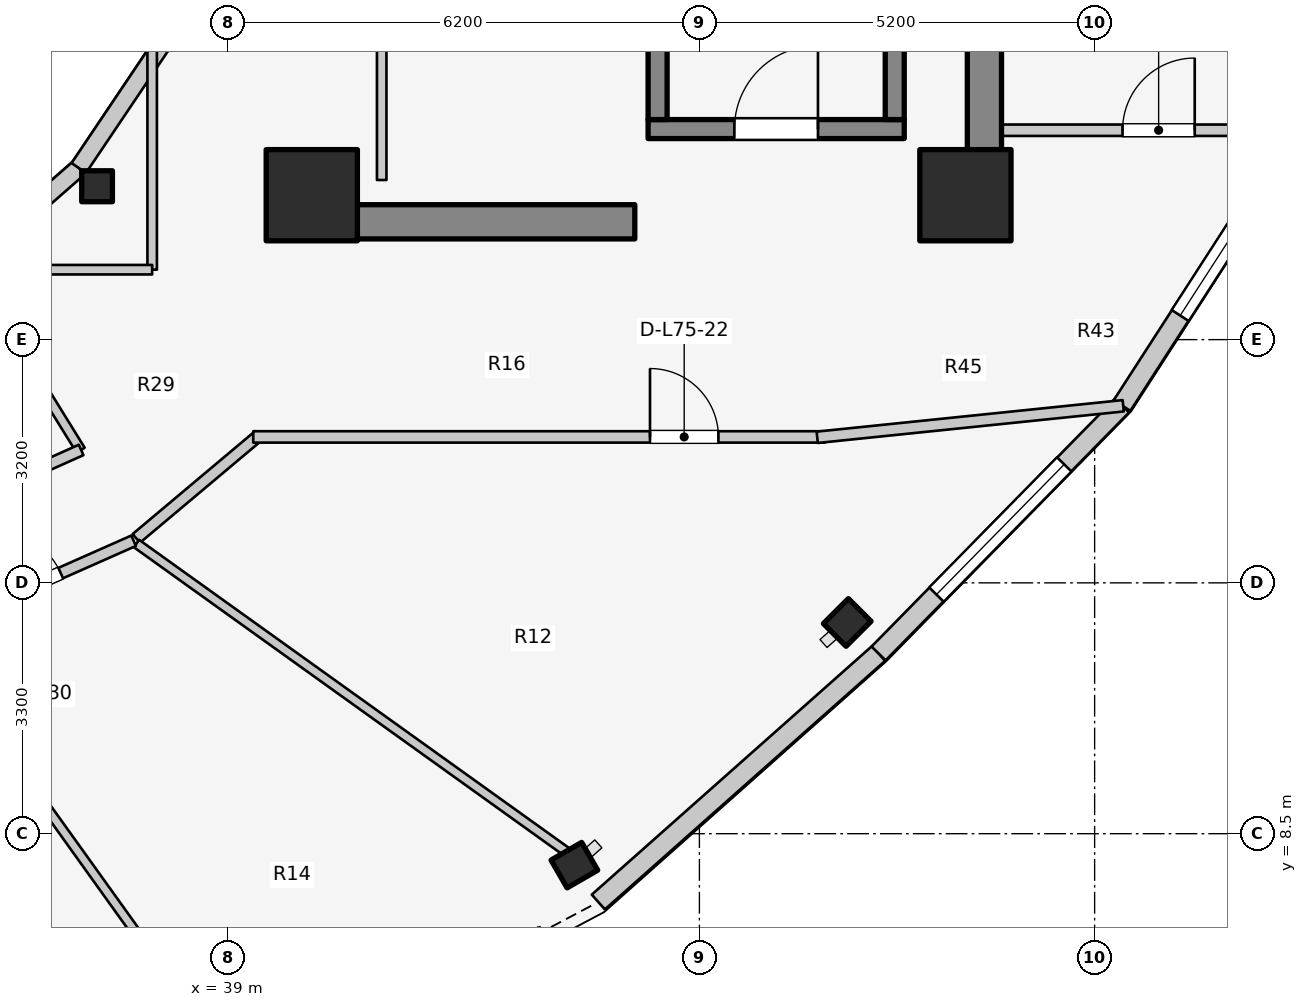
"""IFC4 building model, lengths in metres.
Left out: names, types, materials, properties, quantities, classifications, styles, units other than length and angle.
Written with IfcOpenShell. Run it as: python <this file> out.ifc"""

import sys

from ifc_helpers import new_model, si_unit, direction, frame, frame_2d, origin, origin_2d, place, context, subcontext, project, spatial, rectangle, i_section, extrude, element, fill, save


model = new_model("IFC4")
c1 = context("Model", 3, precision=1e-05, world=origin(), true_north=direction((0.0, 1.0)))
c2 = subcontext(c1, "Body", "Model", "MODEL_VIEW")
j1 = project(units=[si_unit("LENGTHUNIT", "METRE"), si_unit("PLANEANGLEUNIT", "RADIAN")], contexts=[c1])
p1 = place(None, origin())
s1 = spatial("IfcSite", under=j1, at=p1, CompositionType="ELEMENT")
p2 = place(p1, origin())
s2 = spatial("IfcBuilding", under=s1, at=p2, CompositionType="ELEMENT")
p3 = place(p2, frame((0.0, 0.0, 246.0)))
s3 = spatial("IfcBuildingStorey", under=s2, at=p3, CompositionType="ELEMENT", Elevation=246.0)
p4 = place(p3, frame((48.95, 17.05, 0.0), z_axis=(0.0, 0.0, 1.0), x_axis=(0.0, 1.0, 0.0)))
e1 = element("IfcWall", 1, at=p4, inside=s3, PredefinedType="SHEAR", context=c2, shape_type="SweptSolid", body=[
    extrude(rectangle(XDim=12.8, YDim=0.45, at=frame_2d((6.4, 0.0))), origin(), (0.0, 0.0, 1.0), 3.6),
])
p5 = place(p3, frame((39.85, 16.55, 0.0), z_axis=(0.0, 0.0, 1.0), x_axis=(1.0, 0.0, 0.0)))
e2 = element("IfcWall", 2, at=p5, inside=s3, PredefinedType="SHEAR", context=c2, shape_type="SweptSolid", body=[
    extrude(rectangle(XDim=4.5, YDim=0.45, at=frame_2d((2.25, 0.0))), origin(), (0.0, 0.0, 1.0), 3.6),
])
p6 = place(p3, frame((44.525, 17.77, 0.0), z_axis=(0.0, 0.0, 1.0), x_axis=(1.0, 0.0, 0.0)))
e3 = element("IfcWall", 3, at=p6, inside=s3, PredefinedType="SOLIDWALL", context=c2, shape_type="SweptSolid", body=[
    extrude(rectangle(XDim=3.37, YDim=0.25, at=frame_2d((1.685, 0.0))), origin(), (0.0, 0.0, 1.0), 3.6),
])
p7 = place(p6, frame((1.135, 0.0, 0.0)))
e4 = element("IfcOpeningElement", 4, at=p7, cuts=e3, PredefinedType="OPENING", context=c2, shape_type="SweptSolid", body=[
    extrude(rectangle(XDim=1.1, YDim=2.1, at=frame_2d((0.55, 1.05))), frame((0.0, 0.135, 0.0), z_axis=(0.0, -1.0, 0.0), x_axis=(1.0, 0.0, 0.0)), (0.0, 0.0, 1.0), 0.27),
])
for number, where, z_axis, x_axis in (
    (5, (44.65, 17.895, 0.0), (0.0, 0.0, 1.0), (0.0, 1.0, 0.0)),
    (6, (47.77, 17.895, 0.0), (0.0, 0.0, 1.0), (0.0, 1.0, 0.0)),
):
    element("IfcWall", number, at=place(p3, frame(where, z_axis=z_axis, x_axis=x_axis)), inside=s3, PredefinedType="SOLIDWALL", context=c2, shape_type="SweptSolid", body=[
        extrude(rectangle(XDim=7.81, YDim=0.25, at=frame_2d((3.905, 0.0))), origin(), (0.0, 0.0, 1.0), 3.6),
    ])
for number, where, z_axis, x_axis in (
    (7, (40.1, 16.9, 0.0), (0.0, 0.0, 1.0), (1.0, 0.0, 0.0)),
    (8, (48.7, 16.9, 0.0), (0.0, 0.0, 1.0), (1.0, 0.0, 0.0)),
):
    element("IfcColumn", number, at=place(p3, frame(where, z_axis=z_axis, x_axis=x_axis)), inside=s3, PredefinedType="COLUMN", context=c2, shape_type="SweptSolid", body=[
        extrude(rectangle(XDim=1.2, YDim=1.2, at=origin_2d()), origin(), (0.0, 0.0, 1.0), 3.6),
    ])
p8 = place(p3, frame((43.555, 8.086, 0.0), z_axis=(0.0, 0.0, 1.0), x_axis=(0.5, -0.866025403784, 0.0)))
e9 = element("IfcColumn", 9, at=p8, inside=s3, PredefinedType="COLUMN", context=c2, shape_type="SweptSolid", body=[
    extrude(i_section(OverallWidth=0.422, OverallDepth=0.465, WebThickness=0.045, FlangeThickness=0.073, FilletRadius=0.025, at=origin_2d()), origin(), (0.0, 0.0, 1.0), 3.6),
])
p9 = place(p3, frame((37.275, 17.018, 0.0), z_axis=(0.0, 0.0, 1.0), x_axis=(1.0, 0.0, 0.0)))
e10 = element("IfcColumn", 10, at=p9, inside=s3, PredefinedType="COLUMN", context=c2, shape_type="SweptSolid", body=[
    extrude(i_section(OverallWidth=0.404, OverallDepth=0.407, WebThickness=0.027, FlangeThickness=0.044, FilletRadius=0.025, at=origin_2d()), origin(), (0.0, 0.0, 1.0), 3.6),
])
p10 = place(p3, frame((47.145, 11.279, 0.0), z_axis=(0.0, 0.0, 1.0), x_axis=(0.707106781187, -0.707106781187, 0.0)))
e11 = element("IfcColumn", 11, at=p10, inside=s3, PredefinedType="COLUMN", context=c2, shape_type="SweptSolid", body=[
    extrude(i_section(OverallWidth=0.422, OverallDepth=0.465, WebThickness=0.045, FlangeThickness=0.073, FilletRadius=0.025, at=origin_2d()), origin(), (0.0, 0.0, 1.0), 3.6),
])
p11 = place(p3, frame((35.56, 15.968, 0.0), z_axis=(0.0, 0.0, 1.0), x_axis=(0.752576694707, 0.658504607869, 0.0)))
e12 = element("IfcWall", 12, at=p11, inside=s3, PredefinedType="STANDARD", context=c2, shape_type="SweptSolid", body=[
    extrude(rectangle(XDim=1.959, YDim=0.23, at=frame_2d((0.98, 0.0))), origin(), (0.0, 0.0, 1.0), 2.6),
])
p12 = place(p3, frame((37.035, 17.258, 0.0), z_axis=(0.0, 0.0, 1.0), x_axis=(0.558197800898, 0.829707909492, 0.0)))
e13 = element("IfcWall", 13, at=p12, inside=s3, PredefinedType="STANDARD", context=c2, shape_type="SweptSolid", body=[
    extrude(rectangle(XDim=2.027, YDim=0.23, at=frame_2d((1.013, 0.0))), origin(), (0.0, 0.0, 1.0), 2.6),
])
p13 = place(p3, frame((43.87, 7.601, 0.0), z_axis=(0.0, 0.0, 1.0), x_axis=(0.748165854006, 0.663511759428, 0.0)))
e14 = element("IfcWall", 14, at=p13, inside=s3, PredefinedType="STANDARD", context=c2, shape_type="SweptSolid", body=[
    extrude(rectangle(XDim=4.929, YDim=0.26, at=frame_2d((2.464, 0.0))), origin(), (0.0, 0.0, 1.0), 3.29),
])
p14 = place(p3, frame((47.558, 10.871, 0.0), z_axis=(0.0, 0.0, 1.0), x_axis=(0.700642973333, 0.713512034881, 0.0)))
e15 = element("IfcWall", 15, at=p14, inside=s3, PredefinedType="STANDARD", context=c2, shape_type="SweptSolid", body=[
    extrude(rectangle(XDim=4.572, YDim=0.26, at=frame_2d((2.286, 0.0))), origin(), (0.0, 0.0, 1.0), 3.29),
])
p15 = place(p14, frame((1.086, 0.0, 0.75)))
e16 = element("IfcOpeningElement", 16, at=p15, cuts=e15, PredefinedType="OPENING", context=c2, shape_type="SweptSolid", body=[
    extrude(rectangle(XDim=2.4, YDim=1.7, at=frame_2d((1.2, 0.85))), frame((0.0, 0.14, 0.0), z_axis=(0.0, -1.0, 0.0), x_axis=(1.0, 0.0, 0.0)), (0.0, 0.0, 1.0), 0.28),
])
p16 = place(p3, frame((50.761, 14.133, 0.0), z_axis=(0.0, 0.0, 1.0), x_axis=(0.542641766008, 0.839964233634, 0.0)))
e17 = element("IfcWall", 17, at=p16, inside=s3, PredefinedType="STANDARD", context=c2, shape_type="SweptSolid", body=[
    extrude(rectangle(XDim=4.319, YDim=0.26, at=frame_2d((2.16, 0.0))), origin(), (0.0, 0.0, 1.0), 3.29),
])
p17 = place(p16, frame((1.41, 0.0, 0.75)))
e18 = element("IfcOpeningElement", 18, at=p17, cuts=e17, PredefinedType="OPENING", context=c2, shape_type="SweptSolid", body=[
    extrude(rectangle(XDim=1.5, YDim=1.6, at=frame_2d((0.75, 0.8))), frame((0.0, 0.14, 0.0), z_axis=(0.0, -1.0, 0.0), x_axis=(1.0, 0.0, 0.0)), (0.0, 0.0, 1.0), 0.28),
])
p18 = place(p3, frame((41.02, 17.1, 0.0), z_axis=(0.0, 0.0, 1.0), x_axis=(0.0, 1.0, 0.0)))
e19 = element("IfcWall", 19, at=p18, inside=s3, PredefinedType="PARTITIONING", context=c2, shape_type="SweptSolid", body=[
    extrude(rectangle(XDim=2.04, YDim=0.125, at=frame_2d((1.02, 0.0))), origin(), (0.0, 0.0, 1.0), 3.295),
])
p19 = place(p3, frame((35.55, 15.985, 0.0), z_axis=(0.0, 0.0, 1.0), x_axis=(0.52592395012, -0.850531597702, 0.0)))
e20 = element("IfcWall", 20, at=p19, inside=s3, PredefinedType="PARTITIONING", context=c2, shape_type="SweptSolid", body=[
    extrude(rectangle(XDim=2.869, YDim=0.125, at=frame_2d((1.435, 0.0))), origin(), (0.0, 0.0, 1.0), 2.672),
])
p20 = place(p3, frame((34.617, 12.454, 0.0), z_axis=(0.0, 0.0, 1.0), x_axis=(0.912859324183, 0.408274239027, 0.0)))
e21 = element("IfcWall", 21, at=p20, inside=s3, PredefinedType="PARTITIONING", context=c2, shape_type="SweptSolid", body=[
    extrude(rectangle(XDim=2.682, YDim=0.15, at=frame_2d((1.341, 0.0))), origin(), (0.0, 0.0, 1.0), 2.816),
])
p21 = place(p20, frame((0.866, 0.0, 0.0)))
e22 = element("IfcOpeningElement", 22, at=p21, cuts=e21, PredefinedType="OPENING", context=c2, shape_type="SweptSolid", body=[
    extrude(rectangle(XDim=0.95, YDim=2.1, at=frame_2d((0.475, 1.05))), frame((0.0, 0.085, 0.0), z_axis=(0.0, -1.0, 0.0), x_axis=(1.0, 0.0, 0.0)), (0.0, 0.0, 1.0), 0.17),
])
p22 = place(p3, frame((38.0, 15.92, 0.0), z_axis=(0.0, 0.0, 1.0), x_axis=(0.0, 1.0, 0.0)))
e23 = element("IfcWall", 23, at=p22, inside=s3, PredefinedType="PARTITIONING", context=c2, shape_type="SweptSolid", body=[
    extrude(rectangle(XDim=4.28, YDim=0.125, at=frame_2d((2.14, 0.0))), origin(), (0.0, 0.0, 1.0), 2.672),
])
p23 = place(p3, frame((35.4, 15.92, 0.0), z_axis=(0.0, 0.0, 1.0), x_axis=(1.0, 0.0, 0.0)))
e24 = element("IfcWall", 24, at=p23, inside=s3, PredefinedType="PARTITIONING", context=c2, shape_type="SweptSolid", body=[
    extrude(rectangle(XDim=2.6, YDim=0.125, at=frame_2d((1.3, 0.0))), origin(), (0.0, 0.0, 1.0), 2.672),
])
p24 = place(p3, frame((48.95, 17.755, 0.0), z_axis=(0.0, 0.0, 1.0), x_axis=(1.0, 0.0, 0.0)))
e25 = element("IfcWall", 25, at=p24, inside=s3, PredefinedType="PARTITIONING", context=c2, shape_type="SweptSolid", body=[
    extrude(rectangle(XDim=4.175, YDim=0.15, at=frame_2d((2.087, 0.0))), origin(), (0.0, 0.0, 1.0), 3.295),
])
p25 = place(p24, frame((1.817, 0.0, 0.0)))
e26 = element("IfcOpeningElement", 26, at=p25, cuts=e25, PredefinedType="OPENING", context=c2, shape_type="SweptSolid", body=[
    extrude(rectangle(XDim=0.95, YDim=2.1, at=frame_2d((0.475, 1.05))), frame((0.0, 0.085, 0.0), z_axis=(0.0, -1.0, 0.0), x_axis=(1.0, 0.0, 0.0)), (0.0, 0.0, 1.0), 0.17),
])
p26 = place(p3, frame((37.791, 12.385, 0.0), z_axis=(0.0, 0.0, 1.0), x_axis=(0.765677451641, 0.643224719711, 0.0)))
e27 = element("IfcWall", 27, at=p26, inside=s3, PredefinedType="PARTITIONING", context=c2, shape_type="SweptSolid", body=[
    extrude(rectangle(XDim=2.105, YDim=0.15, at=frame_2d((1.053, 0.0))), origin(), (0.0, 0.0, 1.0), 2.816),
])
p27 = place(p3, frame((39.33, 13.72, 0.0), z_axis=(0.0, 0.0, 1.0), x_axis=(1.0, 0.0, 0.0)))
e28 = element("IfcWall", 28, at=p27, inside=s3, PredefinedType="PARTITIONING", context=c2, shape_type="SweptSolid", body=[
    extrude(rectangle(XDim=7.52, YDim=0.15, at=frame_2d((3.76, 0.0))), origin(), (0.0, 0.0, 1.0), 2.816),
])
p28 = place(p27, frame((5.22, 0.0, 0.0)))
e29 = element("IfcOpeningElement", 29, at=p28, cuts=e28, PredefinedType="OPENING", context=c2, shape_type="SweptSolid", body=[
    extrude(rectangle(XDim=0.9, YDim=2.1, at=frame_2d((0.45, 1.05))), frame((0.0, 0.085, 0.0), z_axis=(0.0, -1.0, 0.0), x_axis=(1.0, 0.0, 0.0)), (0.0, 0.0, 1.0), 0.17),
])
p29 = place(p3, frame((46.75, 13.715, 0.0), z_axis=(0.0, 0.0, 1.0), x_axis=(0.994734711466, 0.102483431859, 0.0)))
e30 = element("IfcWall", 30, at=p29, inside=s3, PredefinedType="PARTITIONING", context=c2, shape_type="SweptSolid", body=[
    extrude(rectangle(XDim=4.047, YDim=0.15, at=frame_2d((2.024, 0.0))), origin(), (0.0, 0.0, 1.0), 2.66),
])
p30 = place(p3, frame((35.008, 11.076, 0.0), z_axis=(0.0, 0.0, 1.0), x_axis=(0.582726066442, -0.812668648029, 0.0)))
e31 = element("IfcWall", 31, at=p30, inside=s3, PredefinedType="MOVABLE", context=c2, shape_type="SweptSolid", body=[
    extrude(rectangle(XDim=6.515, YDim=0.12, at=frame_2d((3.257, 0.0))), origin(), (0.0, 0.0, 1.0), 2.66),
])
p31 = place(p3, frame((37.794, 12.318, 0.0), z_axis=(0.0, 0.0, 1.0), x_axis=(0.812763742602, -0.582593424879, 0.0)))
e32 = element("IfcWall", 32, at=p31, inside=s3, PredefinedType="MOVABLE", context=c2, shape_type="SweptSolid", body=[
    extrude(rectangle(XDim=6.966, YDim=0.12, at=frame_2d((3.483, 0.0))), origin(), (0.0, 0.0, 1.0), 2.66),
])
p32 = place(p3, frame((34.968, 11.119, 0.0), z_axis=(0.0, 0.0, 1.0), x_axis=(0.914302802833, 0.405031337963, 0.0)))
e33 = element("IfcWall", 33, at=p32, inside=s3, PredefinedType="PARTITIONING", context=c2, shape_type="SweptSolid", body=[
    extrude(rectangle(XDim=3.049, YDim=0.15, at=frame_2d((1.525, 0.0))), origin(), (0.0, 0.0, 1.0), 2.816),
])
p33 = place(p32, frame((1.05, 0.0, 0.0)))
e34 = element("IfcOpeningElement", 34, at=p33, cuts=e33, PredefinedType="OPENING", context=c2, shape_type="SweptSolid", body=[
    extrude(rectangle(XDim=0.95, YDim=2.1, at=frame_2d((0.475, 1.05))), frame((0.0, 0.085, 0.0), z_axis=(0.0, -1.0, 0.0), x_axis=(1.0, 0.0, 0.0)), (0.0, 0.0, 1.0), 0.17),
])
p34 = place(p15, origin())
e35 = element("IfcWindow", 35, at=p34, inside=s3, PartitioningType="SINGLE_PANEL", PredefinedType="WINDOW", context=c2, shape_type="SweptSolid", body=[
    extrude(rectangle(XDim=2.4, YDim=1.7, at=frame_2d((1.2, 0.85))), frame((0.0, 0.03, 0.0), z_axis=(0.0, -1.0, 0.0), x_axis=(1.0, 0.0, 0.0)), (0.0, 0.0, 1.0), 0.06),
])
fill(e16, e35)
p35 = place(p17, origin())
e36 = element("IfcWindow", 36, at=p35, inside=s3, PartitioningType="SINGLE_PANEL", PredefinedType="WINDOW", context=c2, shape_type="SweptSolid", body=[
    extrude(rectangle(XDim=1.5, YDim=1.6, at=frame_2d((0.75, 0.8))), frame((0.0, 0.03, 0.0), z_axis=(0.0, -1.0, 0.0), x_axis=(1.0, 0.0, 0.0)), (0.0, 0.0, 1.0), 0.06),
])
fill(e18, e36)
p36 = place(p7, origin())
e37 = element("IfcDoor", 37, at=p36, inside=s3, OperationType="SINGLE_SWING_RIGHT", PredefinedType="DOOR", context=c2, shape_type="SweptSolid", body=[
    extrude(rectangle(XDim=1.1, YDim=2.1, at=frame_2d((0.55, 1.05))), frame((0.0, 0.025, 0.0), z_axis=(0.0, -1.0, 0.0), x_axis=(1.0, 0.0, 0.0)), (0.0, 0.0, 1.0), 0.05),
])
fill(e4, e37)
p37 = place(p25, origin())
e38 = element("IfcDoor", 38, at=p37, inside=s3, OperationType="SINGLE_SWING_RIGHT", PredefinedType="DOOR", context=c2, shape_type="SweptSolid", body=[
    extrude(rectangle(XDim=0.95, YDim=2.1, at=frame_2d((0.475, 1.05))), frame((0.0, 0.025, 0.0), z_axis=(0.0, -1.0, 0.0), x_axis=(1.0, 0.0, 0.0)), (0.0, 0.0, 1.0), 0.05),
])
fill(e26, e38)
p38 = place(p28, origin())
e39 = element("IfcDoor", 39, at=p38, inside=s3, OperationType="SINGLE_SWING_LEFT", PredefinedType="DOOR", context=c2, shape_type="SweptSolid", body=[
    extrude(rectangle(XDim=0.9, YDim=2.1, at=frame_2d((0.45, 1.05))), frame((0.0, 0.025, 0.0), z_axis=(0.0, -1.0, 0.0), x_axis=(1.0, 0.0, 0.0)), (0.0, 0.0, 1.0), 0.05),
])
fill(e29, e39)
p39 = place(p33, origin())
e40 = element("IfcDoor", 40, at=p39, inside=s3, OperationType="SINGLE_SWING_LEFT", PredefinedType="DOOR", context=c2, shape_type="SweptSolid", body=[
    extrude(rectangle(XDim=0.95, YDim=2.1, at=frame_2d((0.475, 1.05))), frame((0.0, 0.025, 0.0), z_axis=(0.0, -1.0, 0.0), x_axis=(1.0, 0.0, 0.0)), (0.0, 0.0, 1.0), 0.05),
])
fill(e34, e40)
save(model, sys.argv[1])
